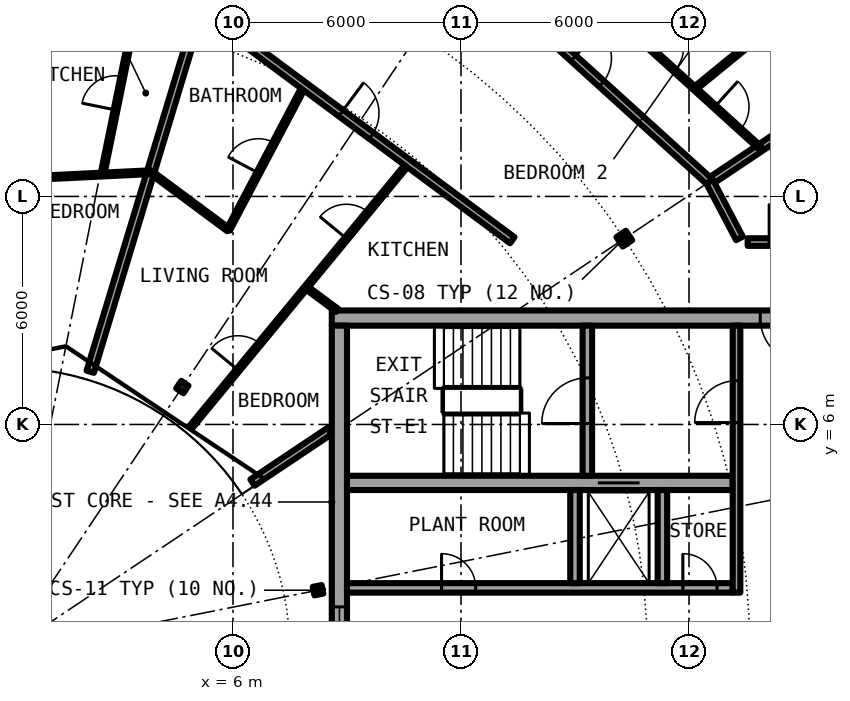
"""IFC4 building model, lengths in metres.
Left out: names, types, materials, properties, quantities, classifications, styles, units other than length and angle.
Written with IfcOpenShell. Run it as: python <this file> out.ifc"""

import sys

from ifc_helpers import new_model, si_unit, direction, frame, frame_2d, origin, origin_2d, place, context, subcontext, project, spatial, rectangle, i_section, extrude, element, fill, save


model = new_model("IFC4")
c1 = context("Model", 3, precision=1e-05, world=origin(), true_north=direction((0.0, 1.0)))
c2 = subcontext(c1, "Body", "Model", "MODEL_VIEW")
j1 = project(units=[si_unit("LENGTHUNIT", "METRE"), si_unit("PLANEANGLEUNIT", "RADIAN")], contexts=[c1])
p1 = place(None, origin())
s1 = spatial("IfcSite", under=j1, at=p1, CompositionType="ELEMENT")
p2 = place(p1, origin())
s2 = spatial("IfcBuilding", under=s1, at=p2, CompositionType="ELEMENT")
p3 = place(p2, frame((0.0, 0.0, 234.05)))
s3 = spatial("IfcBuildingStorey", under=s2, at=p3, CompositionType="ELEMENT", Elevation=234.05)
p4 = place(p3, frame((16.297, 10.889, 0.0), z_axis=(0.0, 0.0, 1.0), x_axis=(0.831469612303, 0.55557023302, 0.0)))
e1 = element("IfcColumn", 1, at=p4, inside=s3, PredefinedType="COLUMN", context=c2, shape_type="SweptSolid", body=[
    extrude(i_section(OverallWidth=0.3, OverallDepth=0.3, WebThickness=0.011, FlangeThickness=0.019, FilletRadius=0.027, at=origin_2d()), origin(), (0.0, 0.0, 1.0), 3.05),
])
for number, where, z_axis, x_axis in (
    (2, (8.239, 1.639, 0.0), (0.0, 0.0, 1.0), (0.981, 0.195, 0.0)),
    (3, (4.667, 6.984, 0.0), (0.0, 0.0, 1.0), (0.556, 0.831, 0.0)),
):
    element("IfcColumn", number, at=place(p3, frame(where, z_axis=z_axis, x_axis=x_axis)), inside=s3, PredefinedType="COLUMN", context=c2, shape_type="SweptSolid", body=[
        extrude(i_section(OverallWidth=0.24, OverallDepth=0.23, WebThickness=0.008, FlangeThickness=0.012, FilletRadius=0.021, at=origin_2d()), origin(), (0.0, 0.0, 1.0), 3.05),
    ])
p5 = place(p3, frame((22.699, 15.167, 0.0), z_axis=(0.0, 0.0, 1.0), x_axis=(-0.634382322723, 0.773019449054, 0.0)))
e4 = element("IfcWall", 4, at=p5, inside=s3, PredefinedType="SOLIDWALL", context=c2, shape_type="SweptSolid", body=[
    extrude(rectangle(XDim=5.352, YDim=0.25, at=frame_2d((2.676, 0.0))), origin(), (0.0, 0.0, 1.0), 2.7),
])
p6 = place(p5, frame((0.841, 0.0, 0.0)))
e5 = element("IfcOpeningElement", 5, at=p6, cuts=e4, PredefinedType="OPENING", context=c2, shape_type="SweptSolid", body=[
    extrude(rectangle(XDim=1.0, YDim=2.2, at=frame_2d((0.5, 1.1))), frame((0.0, 0.135, 0.0), z_axis=(0.0, -1.0, 0.0), x_axis=(1.0, 0.0, 0.0)), (0.0, 0.0, 1.0), 0.27),
])
p7 = place(p5, frame((3.111, 0.0, 0.3)))
e6 = element("IfcOpeningElement", 6, at=p7, cuts=e4, PredefinedType="OPENING", context=c2, shape_type="SweptSolid", body=[
    extrude(rectangle(XDim=1.8, YDim=2.1, at=frame_2d((0.9, 1.05))), frame((0.0, 0.135, 0.0), z_axis=(0.0, -1.0, 0.0), x_axis=(1.0, 0.0, 0.0)), (0.0, 0.0, 1.0), 0.27),
])
p8 = place(p3, frame((22.0, 8.8, 0.0), z_axis=(0.0, 0.0, 1.0), x_axis=(-1.0, 0.0, 0.0)))
e7 = element("IfcWall", 7, at=p8, inside=s3, PredefinedType="SHEAR", context=c2, shape_type="SweptSolid", body=[
    extrude(rectangle(XDim=13.4, YDim=0.4, at=frame_2d((6.7, 0.0))), origin(), (0.0, 0.0, 1.0), 3.05),
])
p9 = place(p8, frame((0.925, 0.0, 0.0)))
e8 = element("IfcOpeningElement", 8, at=p9, cuts=e7, PredefinedType="OPENING", context=c2, shape_type="SweptSolid", body=[
    extrude(rectangle(XDim=1.2, YDim=2.3, at=frame_2d((0.6, 1.15))), frame((0.0, 0.21, 0.0), z_axis=(0.0, -1.0, 0.0), x_axis=(1.0, 0.0, 0.0)), (0.0, 0.0, 1.0), 0.42),
])
p10 = place(p3, frame((8.8, -8.6, 0.0), z_axis=(0.0, 0.0, 1.0), x_axis=(0.0, 1.0, 0.0)))
e9 = element("IfcWall", 9, at=p10, inside=s3, PredefinedType="SHEAR", context=c2, shape_type="SweptSolid", body=[
    extrude(rectangle(XDim=17.2, YDim=0.4, at=frame_2d((8.6, 0.0))), origin(), (0.0, 0.0, 1.0), 3.05),
])
p11 = place(p10, frame((7.4, 0.0, 0.1)))
e10 = element("IfcOpeningElement", 10, at=p11, cuts=e9, PredefinedType="OPENING", context=c2, shape_type="SweptSolid", body=[
    extrude(rectangle(XDim=2.4, YDim=2.2, at=frame_2d((1.2, 1.1))), frame((0.0, 0.21, 0.0), z_axis=(0.0, -1.0, 0.0), x_axis=(1.0, 0.0, 0.0)), (0.0, 0.0, 1.0), 0.42),
])
p12 = place(p3, frame((9.0, 1.7, 0.0), z_axis=(0.0, 0.0, 1.0), x_axis=(1.0, 0.0, 0.0)))
e11 = element("IfcWall", 11, at=p12, inside=s3, PredefinedType="SHEAR", context=c2, shape_type="SweptSolid", body=[
    extrude(rectangle(XDim=10.15, YDim=0.25, at=frame_2d((5.075, 0.0))), origin(), (0.0, 0.0, 1.0), 3.05),
])
p13 = place(p12, frame((2.488, 0.0, 0.0)))
e12 = element("IfcOpeningElement", 12, at=p13, cuts=e11, PredefinedType="OPENING", context=c2, shape_type="SweptSolid", body=[
    extrude(rectangle(XDim=0.9, YDim=2.3, at=frame_2d((0.45, 1.15))), frame((0.0, 0.135, 0.0), z_axis=(0.0, -1.0, 0.0), x_axis=(1.0, 0.0, 0.0)), (0.0, 0.0, 1.0), 0.27),
])
p14 = place(p12, frame((8.837, 0.0, 0.0)))
e13 = element("IfcOpeningElement", 13, at=p14, cuts=e11, PredefinedType="OPENING", context=c2, shape_type="SweptSolid", body=[
    extrude(rectangle(XDim=0.9, YDim=2.3, at=frame_2d((0.45, 1.15))), frame((0.0, 0.135, 0.0), z_axis=(0.0, -1.0, 0.0), x_axis=(1.0, 0.0, 0.0)), (0.0, 0.0, 1.0), 0.27),
])
p15 = place(p3, frame((9.0, 4.462, 0.0), z_axis=(0.0, 0.0, 1.0), x_axis=(1.0, 0.0, 0.0)))
e14 = element("IfcWall", 14, at=p15, inside=s3, PredefinedType="SHEAR", context=c2, shape_type="SweptSolid", body=[
    extrude(rectangle(XDim=10.15, YDim=0.375, at=frame_2d((5.075, 0.0))), origin(), (0.0, 0.0, 1.0), 3.05),
])
p16 = place(p15, frame((6.6, 0.0, 0.0)))
e15 = element("IfcOpeningElement", 15, at=p16, cuts=e14, PredefinedType="OPENING", context=c2, shape_type="SweptSolid", body=[
    extrude(rectangle(XDim=1.1, YDim=2.3, at=frame_2d((0.55, 1.15))), frame((0.0, 0.198, 0.0), z_axis=(0.0, -1.0, 0.0), x_axis=(1.0, 0.0, 0.0)), (0.0, 0.0, 1.0), 0.395),
])
p17 = place(p3, frame((15.325, 4.65, 0.0), z_axis=(0.0, 0.0, 1.0), x_axis=(0.0, 1.0, 0.0)))
e16 = element("IfcWall", 16, at=p17, inside=s3, PredefinedType="SHEAR", context=c2, shape_type="SweptSolid", body=[
    extrude(rectangle(XDim=3.95, YDim=0.25, at=frame_2d((1.975, 0.0))), origin(), (0.0, 0.0, 1.0), 3.05),
])
p18 = place(p17, frame((1.375, 0.0, 0.0)))
e17 = element("IfcOpeningElement", 17, at=p18, cuts=e16, PredefinedType="OPENING", context=c2, shape_type="SweptSolid", body=[
    extrude(rectangle(XDim=1.2, YDim=2.3, at=frame_2d((0.6, 1.15))), frame((0.0, 0.135, 0.0), z_axis=(0.0, -1.0, 0.0), x_axis=(1.0, 0.0, 0.0)), (0.0, 0.0, 1.0), 0.27),
])
for number, where, z_axis, x_axis in (
    (18, (15.0, 1.825, 0.0), (0.0, 0.0, 1.0), (0.0, 1.0, 0.0)),
    (19, (17.3, 1.825, 0.0), (0.0, 0.0, 1.0), (0.0, 1.0, 0.0)),
):
    element("IfcWall", number, at=place(p3, frame(where, z_axis=z_axis, x_axis=x_axis)), inside=s3, PredefinedType="SOLIDWALL", context=c2, shape_type="SweptSolid", body=[
        extrude(rectangle(XDim=2.45, YDim=0.25, at=frame_2d((1.225, 0.0))), origin(), (0.0, 0.0, 1.0), 2.7),
    ])
p19 = place(p3, frame((19.25, 1.575, 0.0), z_axis=(0.0, 0.0, 1.0), x_axis=(0.0, 1.0, 0.0)))
e20 = element("IfcWall", 20, at=p19, inside=s3, PredefinedType="SOLIDWALL", context=c2, shape_type="SweptSolid", body=[
    extrude(rectangle(XDim=7.025, YDim=0.2, at=frame_2d((3.513, 0.0))), origin(), (0.0, 0.0, 1.0), 2.7),
])
p20 = place(p19, frame((4.475, 0.0, 0.0)))
e21 = element("IfcOpeningElement", 21, at=p20, cuts=e20, PredefinedType="OPENING", context=c2, shape_type="SweptSolid", body=[
    extrude(rectangle(XDim=1.1, YDim=2.3, at=frame_2d((0.55, 1.15))), frame((0.0, 0.11, 0.0), z_axis=(0.0, -1.0, 0.0), x_axis=(1.0, 0.0, 0.0)), (0.0, 0.0, 1.0), 0.22),
])
p21 = place(p3, frame((2.243, 7.387, 0.0), z_axis=(0.0, 0.0, 1.0), x_axis=(0.289692342235, 0.95711981844, 0.0)))
e22 = element("IfcWall", 22, at=p21, inside=s3, PredefinedType="PARTITIONING", context=c2, shape_type="SweptSolid", body=[
    extrude(rectangle(XDim=9.98, YDim=0.2, at=frame_2d((4.99, 0.0))), origin(), (0.0, 0.0, 1.0), 2.7),
])
p22 = place(p3, frame((2.564, 12.578, 0.0), z_axis=(0.0, 0.0, 1.0), x_axis=(0.199826294126, 0.979831338637, 0.0)))
e23 = element("IfcWall", 23, at=p22, inside=s3, PredefinedType="PARTITIONING", context=c2, shape_type="SweptSolid", body=[
    extrude(rectangle(XDim=4.364, YDim=0.1, at=frame_2d((2.182, 0.0))), origin(), (0.0, 0.0, 1.0), 2.7),
])
p23 = place(p22, frame((1.732, 0.0, 0.0)))
e24 = element("IfcOpeningElement", 24, at=p23, cuts=e23, PredefinedType="OPENING", context=c2, shape_type="SweptSolid", body=[
    extrude(rectangle(XDim=0.9, YDim=2.3, at=frame_2d((0.45, 1.15))), frame((0.0, 0.06, 0.0), z_axis=(0.0, -1.0, 0.0), x_axis=(1.0, 0.0, 0.0)), (0.0, 0.0, 1.0), 0.12),
])
p24 = place(p3, frame((4.912, 5.955, 0.0), z_axis=(0.0, 0.0, 1.0), x_axis=(0.636045954217, 0.771651180342, 0.0)))
e25 = element("IfcWall", 25, at=p24, inside=s3, PredefinedType="PARTITIONING", context=c2, shape_type="SweptSolid", body=[
    extrude(rectangle(XDim=8.968, YDim=0.1, at=frame_2d((4.484, 0.0))), origin(), (0.0, 0.0, 1.0), 2.7),
])
p25 = place(p24, frame((6.401, 0.0, 0.0)))
e26 = element("IfcOpeningElement", 26, at=p25, cuts=e25, PredefinedType="OPENING", context=c2, shape_type="SweptSolid", body=[
    extrude(rectangle(XDim=0.9, YDim=2.3, at=frame_2d((0.45, 1.15))), frame((0.0, 0.06, 0.0), z_axis=(0.0, -1.0, 0.0), x_axis=(1.0, 0.0, 0.0)), (0.0, 0.0, 1.0), 0.12),
])
p26 = place(p24, frame((1.917, 0.0, 0.0)))
e27 = element("IfcOpeningElement", 27, at=p26, cuts=e25, PredefinedType="OPENING", context=c2, shape_type="SweptSolid", body=[
    extrude(rectangle(XDim=0.9, YDim=2.3, at=frame_2d((0.45, 1.15))), frame((0.0, 0.06, 0.0), z_axis=(0.0, -1.0, 0.0), x_axis=(1.0, 0.0, 0.0)), (0.0, 0.0, 1.0), 0.12),
])
p27 = place(p3, frame((5.877, 11.125, 0.0), z_axis=(0.0, 0.0, 1.0), x_axis=(0.467030118529, 0.884241408432, 0.0)))
e28 = element("IfcWall", 28, at=p27, inside=s3, PredefinedType="PARTITIONING", context=c2, shape_type="SweptSolid", body=[
    extrude(rectangle(XDim=4.278, YDim=0.1, at=frame_2d((2.139, 0.0))), origin(), (0.0, 0.0, 1.0), 2.7),
])
p28 = place(p27, frame((1.689, 0.0, 0.0)))
e29 = element("IfcOpeningElement", 29, at=p28, cuts=e28, PredefinedType="OPENING", context=c2, shape_type="SweptSolid", body=[
    extrude(rectangle(XDim=0.9, YDim=2.3, at=frame_2d((0.45, 1.15))), frame((0.0, 0.06, 0.0), z_axis=(0.0, -1.0, 0.0), x_axis=(1.0, 0.0, 0.0)), (0.0, 0.0, 1.0), 0.12),
])
p29 = place(p3, frame((18.151, 14.838, 0.0), z_axis=(0.0, 0.0, 1.0), x_axis=(0.774321581607, 0.63279229472, 0.0)))
e30 = element("IfcWall", 30, at=p29, inside=s3, PredefinedType="PARTITIONING", context=c2, shape_type="SweptSolid", body=[
    extrude(rectangle(XDim=3.731, YDim=0.1, at=frame_2d((1.866, 0.0))), origin(), (0.0, 0.0, 1.0), 2.7),
])
p30 = place(p3, frame((18.542, 12.389, 0.0), z_axis=(0.0, 0.0, 1.0), x_axis=(0.831340764735, 0.555763018642, 0.0)))
e31 = element("IfcWall", 31, at=p30, inside=s3, PredefinedType="PARTITIONING", context=c2, shape_type="SweptSolid", body=[
    extrude(rectangle(XDim=3.073, YDim=0.2, at=frame_2d((1.537, 0.0))), origin(), (0.0, 0.0, 1.0), 2.7),
])
p31 = place(p3, frame((6.513, 4.472, 0.0), z_axis=(0.0, 0.0, 1.0), x_axis=(0.831450132577, 0.555599385382, 0.0)))
e32 = element("IfcWall", 32, at=p31, inside=s3, PredefinedType="PARTITIONING", context=c2, shape_type="SweptSolid", body=[
    extrude(rectangle(XDim=2.443, YDim=0.2, at=frame_2d((1.221, 0.0))), origin(), (0.0, 0.0, 1.0), 2.7),
])
p32 = place(p3, frame((19.543, 10.8, 0.0), z_axis=(0.0, 0.0, 1.0), x_axis=(1.0, 0.0, 0.0)))
e33 = element("IfcWall", 33, at=p32, inside=s3, PredefinedType="PARTITIONING", context=c2, shape_type="SweptSolid", body=[
    extrude(rectangle(XDim=2.132, YDim=0.2, at=frame_2d((1.066, 0.0))), origin(), (0.0, 0.0, 1.0), 2.7),
])
p33 = place(p32, frame((0.566, 0.0, 0.0)))
e34 = element("IfcOpeningElement", 34, at=p33, cuts=e33, PredefinedType="OPENING", context=c2, shape_type="SweptSolid", body=[
    extrude(rectangle(XDim=1.0, YDim=2.3, at=frame_2d((0.5, 1.15))), frame((0.0, 0.11, 0.0), z_axis=(0.0, -1.0, 0.0), x_axis=(1.0, 0.0, 0.0)), (0.0, 0.0, 1.0), 0.22),
])
p34 = place(p3, frame((0.028, 12.452, 0.0), z_axis=(0.0, 0.0, 1.0), x_axis=(0.998809918802, 0.04877239078, 0.0)))
e35 = element("IfcWall", 35, at=p34, inside=s3, PredefinedType="PARTITIONING", context=c2, shape_type="SweptSolid", body=[
    extrude(rectangle(XDim=3.814, YDim=0.1, at=frame_2d((1.907, 0.0))), origin(), (0.0, 0.0, 1.0), 2.7),
])
p35 = place(p3, frame((3.834, 12.64, 0.0), z_axis=(0.0, 0.0, 1.0), x_axis=(0.803259509791, -0.595629213463, 0.0)))
e36 = element("IfcWall", 36, at=p35, inside=s3, PredefinedType="PARTITIONING", context=c2, shape_type="SweptSolid", body=[
    extrude(rectangle(XDim=2.543, YDim=0.1, at=frame_2d((1.272, 0.0))), origin(), (0.0, 0.0, 1.0), 2.7),
])
p36 = place(p3, frame((7.919, 9.611, 0.0), z_axis=(0.0, 0.0, 1.0), x_axis=(0.80321556998, -0.595688465677, 0.0)))
e37 = element("IfcWall", 37, at=p36, inside=s3, PredefinedType="PARTITIONING", context=c2, shape_type="SweptSolid", body=[
    extrude(rectangle(XDim=1.026, YDim=0.1, at=frame_2d((0.513, 0.0))), origin(), (0.0, 0.0, 1.0), 2.7),
])
p37 = place(p3, frame((5.137, 16.938, 0.0), z_axis=(0.0, 0.0, 1.0), x_axis=(0.803229232922, -0.595670042371, 0.0)))
e38 = element("IfcWall", 38, at=p37, inside=s3, PredefinedType="PARTITIONING", context=c2, shape_type="SweptSolid", body=[
    extrude(rectangle(XDim=10.224, YDim=0.2, at=frame_2d((5.112, 0.0))), origin(), (0.0, 0.0, 1.0), 2.7),
])
p38 = place(p37, frame((4.612, 0.0, 0.0)))
e39 = element("IfcOpeningElement", 39, at=p38, cuts=e38, PredefinedType="OPENING", context=c2, shape_type="SweptSolid", body=[
    extrude(rectangle(XDim=1.0, YDim=2.3, at=frame_2d((0.5, 1.15))), frame((0.0, 0.11, 0.0), z_axis=(0.0, -1.0, 0.0), x_axis=(1.0, 0.0, 0.0)), (0.0, 0.0, 1.0), 0.22),
])
p39 = place(p3, frame((10.512, 19.667, 0.0), z_axis=(0.0, 0.0, 1.0), x_axis=(0.740849323054, -0.67167125927, 0.0)))
e40 = element("IfcWall", 40, at=p39, inside=s3, PredefinedType="PARTITIONING", context=c2, shape_type="SweptSolid", body=[
    extrude(rectangle(XDim=10.842, YDim=0.2, at=frame_2d((5.421, 0.0))), origin(), (0.0, 0.0, 1.0), 2.7),
])
p40 = place(p39, frame((6.003, 0.0, 0.0)))
e41 = element("IfcOpeningElement", 41, at=p40, cuts=e40, PredefinedType="OPENING", context=c2, shape_type="SweptSolid", body=[
    extrude(rectangle(XDim=1.0, YDim=2.3, at=frame_2d((0.5, 1.15))), frame((0.0, 0.11, 0.0), z_axis=(0.0, -1.0, 0.0), x_axis=(1.0, 0.0, 0.0)), (0.0, 0.0, 1.0), 0.22),
])
p41 = place(p3, frame((18.542, 12.389, 0.0), z_axis=(0.0, 0.0, 1.0), x_axis=(0.465812036273, -0.88488369115, 0.0)))
e42 = element("IfcWall", 42, at=p41, inside=s3, PredefinedType="PARTITIONING", context=c2, shape_type="SweptSolid", body=[
    extrude(rectangle(XDim=1.687, YDim=0.2, at=frame_2d((0.844, 0.0))), origin(), (0.0, 0.0, 1.0), 2.7),
])
p42 = place(p3, frame((14.709, 17.958, 0.0), z_axis=(0.0, 0.0, 1.0), x_axis=(0.740923753351, -0.671589153962, 0.0)))
e43 = element("IfcWall", 43, at=p42, inside=s3, PredefinedType="PARTITIONING", context=c2, shape_type="SweptSolid", body=[
    extrude(rectangle(XDim=6.969, YDim=0.1, at=frame_2d((3.484, 0.0))), origin(), (0.0, 0.0, 1.0), 2.7),
])
p43 = place(p42, frame((3.034, 0.0, 0.0)))
e44 = element("IfcOpeningElement", 44, at=p43, cuts=e43, PredefinedType="OPENING", context=c2, shape_type="SweptSolid", body=[
    extrude(rectangle(XDim=0.9, YDim=2.3, at=frame_2d((0.45, 1.15))), frame((0.0, 0.06, 0.0), z_axis=(0.0, -1.0, 0.0), x_axis=(1.0, 0.0, 0.0)), (0.0, 0.0, 1.0), 0.12),
])
p44 = place(p42, frame((5.357, 0.0, 0.0)))
e45 = element("IfcOpeningElement", 45, at=p44, cuts=e43, PredefinedType="OPENING", context=c2, shape_type="SweptSolid", body=[
    extrude(rectangle(XDim=0.9, YDim=2.3, at=frame_2d((0.45, 1.15))), frame((0.0, 0.06, 0.0), z_axis=(0.0, -1.0, 0.0), x_axis=(1.0, 0.0, 0.0)), (0.0, 0.0, 1.0), 0.12),
])
p45 = place(p16, origin())
e46 = element("IfcDoor", 46, at=p45, inside=s3, OperationType="DOUBLE_DOOR_SLIDING", PredefinedType="DOOR", context=c2, shape_type="SweptSolid", body=[
    extrude(rectangle(XDim=1.1, YDim=2.3, at=frame_2d((0.55, 1.15))), frame((0.0, 0.025, 0.0), z_axis=(0.0, -1.0, 0.0), x_axis=(1.0, 0.0, 0.0)), (0.0, 0.0, 1.0), 0.05),
])
fill(e15, e46)
p46 = place(p13, origin())
e47 = element("IfcDoor", 47, at=p46, inside=s3, OperationType="SINGLE_SWING_RIGHT", PredefinedType="DOOR", context=c2, shape_type="SweptSolid", body=[
    extrude(rectangle(XDim=0.9, YDim=2.3, at=frame_2d((0.45, 1.15))), frame((0.0, 0.025, 0.0), z_axis=(0.0, -1.0, 0.0), x_axis=(1.0, 0.0, 0.0)), (0.0, 0.0, 1.0), 0.05),
])
fill(e12, e47)
p47 = place(p14, origin())
e48 = element("IfcDoor", 48, at=p47, inside=s3, OperationType="SINGLE_SWING_LEFT", PredefinedType="DOOR", context=c2, shape_type="SweptSolid", body=[
    extrude(rectangle(XDim=0.9, YDim=2.3, at=frame_2d((0.45, 1.15))), frame((0.0, 0.025, 0.0), z_axis=(0.0, -1.0, 0.0), x_axis=(1.0, 0.0, 0.0)), (0.0, 0.0, 1.0), 0.05),
])
fill(e13, e48)
p48 = place(p18, origin())
e49 = element("IfcDoor", 49, at=p48, inside=s3, OperationType="SINGLE_SWING_LEFT", PredefinedType="DOOR", context=c2, shape_type="SweptSolid", body=[
    extrude(rectangle(XDim=1.2, YDim=2.3, at=frame_2d((0.6, 1.15))), frame((0.0, 0.025, 0.0), z_axis=(0.0, -1.0, 0.0), x_axis=(1.0, 0.0, 0.0)), (0.0, 0.0, 1.0), 0.05),
])
fill(e17, e49)
p49 = place(p20, origin())
e50 = element("IfcDoor", 50, at=p49, inside=s3, OperationType="SINGLE_SWING_LEFT", PredefinedType="DOOR", context=c2, shape_type="SweptSolid", body=[
    extrude(rectangle(XDim=1.1, YDim=2.3, at=frame_2d((0.55, 1.15))), frame((0.0, 0.025, 0.0), z_axis=(0.0, -1.0, 0.0), x_axis=(1.0, 0.0, 0.0)), (0.0, 0.0, 1.0), 0.05),
])
fill(e21, e50)
p50 = place(p9, origin())
e51 = element("IfcDoor", 51, at=p50, inside=s3, OperationType="SINGLE_SWING_RIGHT", PredefinedType="DOOR", context=c2, shape_type="SweptSolid", body=[
    extrude(rectangle(XDim=1.2, YDim=2.3, at=frame_2d((0.6, 1.15))), frame((0.0, 0.025, 0.0), z_axis=(0.0, -1.0, 0.0), x_axis=(1.0, 0.0, 0.0)), (0.0, 0.0, 1.0), 0.05),
])
fill(e8, e51)
p51 = place(p11, origin())
e52 = element("IfcWindow", 52, at=p51, inside=s3, PartitioningType="SINGLE_PANEL", PredefinedType="WINDOW", context=c2, shape_type="SweptSolid", body=[
    extrude(rectangle(XDim=2.4, YDim=2.2, at=frame_2d((1.2, 1.1))), frame((0.0, 0.03, 0.0), z_axis=(0.0, -1.0, 0.0), x_axis=(1.0, 0.0, 0.0)), (0.0, 0.0, 1.0), 0.06),
])
fill(e10, e52)
p52 = place(p40, origin())
e53 = element("IfcDoor", 53, at=p52, inside=s3, OperationType="SINGLE_SWING_RIGHT", PredefinedType="DOOR", context=c2, shape_type="SweptSolid", body=[
    extrude(rectangle(XDim=1.0, YDim=2.3, at=frame_2d((0.5, 1.15))), frame((0.0, 0.025, 0.0), z_axis=(0.0, -1.0, 0.0), x_axis=(1.0, 0.0, 0.0)), (0.0, 0.0, 1.0), 0.05),
])
fill(e41, e53)
p53 = place(p43, origin())
e54 = element("IfcDoor", 54, at=p53, inside=s3, OperationType="SINGLE_SWING_LEFT", PredefinedType="DOOR", context=c2, shape_type="SweptSolid", body=[
    extrude(rectangle(XDim=0.9, YDim=2.3, at=frame_2d((0.45, 1.15))), frame((0.0, 0.025, 0.0), z_axis=(0.0, -1.0, 0.0), x_axis=(1.0, 0.0, 0.0)), (0.0, 0.0, 1.0), 0.05),
])
fill(e44, e54)
p54 = place(p44, origin())
e55 = element("IfcDoor", 55, at=p54, inside=s3, OperationType="SINGLE_SWING_RIGHT", PredefinedType="DOOR", context=c2, shape_type="SweptSolid", body=[
    extrude(rectangle(XDim=0.9, YDim=2.3, at=frame_2d((0.45, 1.15))), frame((0.0, 0.025, 0.0), z_axis=(0.0, -1.0, 0.0), x_axis=(1.0, 0.0, 0.0)), (0.0, 0.0, 1.0), 0.05),
])
fill(e45, e55)
p55 = place(p38, origin())
e56 = element("IfcDoor", 56, at=p55, inside=s3, OperationType="SINGLE_SWING_RIGHT", PredefinedType="DOOR", context=c2, shape_type="SweptSolid", body=[
    extrude(rectangle(XDim=1.0, YDim=2.3, at=frame_2d((0.5, 1.15))), frame((0.0, 0.025, 0.0), z_axis=(0.0, -1.0, 0.0), x_axis=(1.0, 0.0, 0.0)), (0.0, 0.0, 1.0), 0.05),
])
fill(e39, e56)
p56 = place(p28, origin())
e57 = element("IfcDoor", 57, at=p56, inside=s3, OperationType="SINGLE_SWING_RIGHT", PredefinedType="DOOR", context=c2, shape_type="SweptSolid", body=[
    extrude(rectangle(XDim=0.9, YDim=2.3, at=frame_2d((0.45, 1.15))), frame((0.0, 0.025, 0.0), z_axis=(0.0, -1.0, 0.0), x_axis=(1.0, 0.0, 0.0)), (0.0, 0.0, 1.0), 0.05),
])
fill(e29, e57)
p57 = place(p25, origin())
e58 = element("IfcDoor", 58, at=p57, inside=s3, OperationType="SINGLE_SWING_RIGHT", PredefinedType="DOOR", context=c2, shape_type="SweptSolid", body=[
    extrude(rectangle(XDim=0.9, YDim=2.3, at=frame_2d((0.45, 1.15))), frame((0.0, 0.025, 0.0), z_axis=(0.0, -1.0, 0.0), x_axis=(1.0, 0.0, 0.0)), (0.0, 0.0, 1.0), 0.05),
])
fill(e26, e58)
p58 = place(p26, origin())
e59 = element("IfcDoor", 59, at=p58, inside=s3, OperationType="SINGLE_SWING_LEFT", PredefinedType="DOOR", context=c2, shape_type="SweptSolid", body=[
    extrude(rectangle(XDim=0.9, YDim=2.3, at=frame_2d((0.45, 1.15))), frame((0.0, 0.025, 0.0), z_axis=(0.0, -1.0, 0.0), x_axis=(1.0, 0.0, 0.0)), (0.0, 0.0, 1.0), 0.05),
])
fill(e27, e59)
p59 = place(p23, origin())
e60 = element("IfcDoor", 60, at=p59, inside=s3, OperationType="SINGLE_SWING_RIGHT", PredefinedType="DOOR", context=c2, shape_type="SweptSolid", body=[
    extrude(rectangle(XDim=0.9, YDim=2.3, at=frame_2d((0.45, 1.15))), frame((0.0, 0.025, 0.0), z_axis=(0.0, -1.0, 0.0), x_axis=(1.0, 0.0, 0.0)), (0.0, 0.0, 1.0), 0.05),
])
fill(e24, e60)
p60 = place(p33, origin())
e61 = element("IfcDoor", 61, at=p60, inside=s3, OperationType="SINGLE_SWING_RIGHT", PredefinedType="DOOR", context=c2, shape_type="SweptSolid", body=[
    extrude(rectangle(XDim=1.0, YDim=2.3, at=frame_2d((0.5, 1.15))), frame((0.0, 0.025, 0.0), z_axis=(0.0, -1.0, 0.0), x_axis=(1.0, 0.0, 0.0)), (0.0, 0.0, 1.0), 0.05),
])
fill(e34, e61)
save(model, sys.argv[1])
